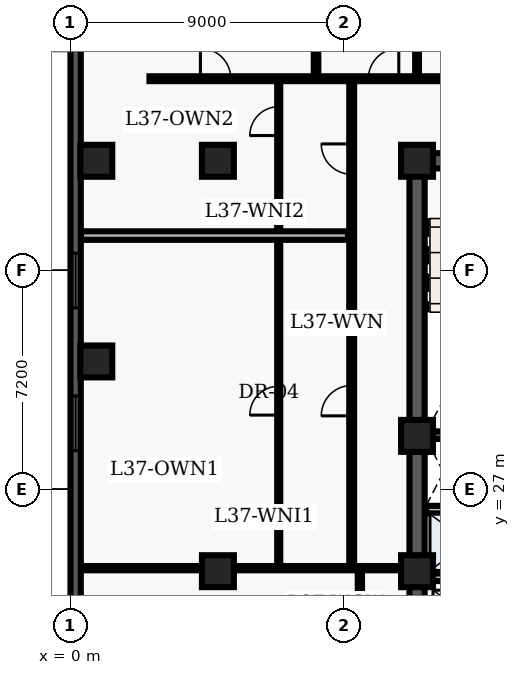
"""IFC4 building model, lengths in metres.
Left out: names, types, materials, properties, quantities, classifications, styles, units other than length and angle.
Written with IfcOpenShell. Run it as: python <this file> out.ifc"""

import sys

from ifc_helpers import new_model, entity, si_unit, converted_unit, direction, frame, origin_with_axes, origin_2d_with_axis, place, context, subcontext, project, spatial, polyline, rectangle, outline, extrude, element, fill, save


model = new_model("IFC4")
c1 = context("Model", 3, precision=1e-05, world=origin_with_axes(), true_north=direction((0.0, 1.0)))
c2 = subcontext(c1, "Body", "Model", "MODEL_VIEW")
j1 = project(units=[si_unit("LENGTHUNIT", "METRE"), converted_unit("PLANEANGLEUNIT", "DEGREE", entity("IfcPlaneAngleMeasure", 0.017), si_unit("PLANEANGLEUNIT", "RADIAN"), dimensions=[0, 0, 0, 0, 0, 0, 0])], contexts=[c1])
p1 = place(None, origin_with_axes())
s1 = spatial("IfcSite", under=j1, at=p1, CompositionType="ELEMENT")
p2 = place(p1, origin_with_axes())
s2 = spatial("IfcBuilding", under=s1, at=p2, CompositionType="ELEMENT")
p3 = place(p2, frame((0.0, 0.0, 152.4), z_axis=(0.0, 0.0, 1.0), x_axis=(1.0, 0.0, 0.0)))
s3 = spatial("IfcBuildingStorey", under=s2, at=p3, CompositionType="ELEMENT", Elevation=152.4)
p4 = place(p3, frame((11.4, 10.8, 0.0), z_axis=(0.0, 0.0, 1.0), x_axis=(0.0, 1.0, 0.0)))
e1 = element("IfcWall", 1, at=p4, inside=s3, PredefinedType="SHEAR", context=c2, shape_type="SweptSolid", body=[
    extrude(outline(polyline([(0.0, -0.25), (27.0, -0.25), (27.0, 0.25), (0.0, 0.25), (0.0, -0.25)])), origin_with_axes(), (0.0, 0.0, 1.0), 3.66),
])
p5 = place(p3, frame((11.4, 37.8, 0.0), z_axis=(0.0, 0.0, 1.0), x_axis=(1.0, 0.0, 0.0)))
e2 = element("IfcWall", 2, at=p5, inside=s3, PredefinedType="SHEAR", context=c2, shape_type="SweptSolid", body=[
    extrude(outline(polyline([(0.0, -0.25), (7.2, -0.25), (7.2, 0.25), (0.0, 0.25), (0.0, -0.25)])), origin_with_axes(), (0.0, 0.0, 1.0), 3.66),
])
p6 = place(p5, frame((2.625, 0.0, 0.0), z_axis=(0.0, 0.0, 1.0), x_axis=(1.0, 0.0, 0.0)))
e3 = element("IfcOpeningElement", 3, at=p6, cuts=e2, PredefinedType="OPENING", context=c2, shape_type="SweptSolid", body=[
    extrude(rectangle(XDim=1.05, YDim=0.52, at=origin_2d_with_axis()), origin_with_axes(), (0.0, 0.0, 1.0), 2.15),
])
p7 = place(p3, frame((11.65, 28.775, 0.0), z_axis=(0.0, 0.0, 1.0), x_axis=(1.0, 0.0, 0.0)))
e4 = element("IfcWall", 4, at=p7, inside=s3, PredefinedType="SHEAR", context=c2, shape_type="SweptSolid", body=[
    extrude(outline(polyline([(0.0, -0.125), (6.7, -0.125), (6.7, 0.125), (0.0, 0.125), (0.0, -0.125)])), origin_with_axes(), (0.0, 0.0, 1.0), 3.66),
])
p8 = place(p3, frame((11.7, 24.1, 0.0), z_axis=(0.0, 0.0, 1.0), x_axis=(1.0, 0.0, 0.0)))
e5 = element("IfcWall", 5, at=p8, inside=s3, PredefinedType="SOLIDWALL", context=c2, shape_type="SweptSolid", body=[
    extrude(outline(polyline([(0.0, -0.125), (6.6, -0.125), (6.6, 0.125), (0.0, 0.125), (0.0, -0.125)])), origin_with_axes(), (0.0, 0.0, 1.0), 2.7),
])
p9 = place(p8, frame((3.75, 0.0, 0.0), z_axis=(0.0, 0.0, 1.0), x_axis=(1.0, 0.0, 0.0)))
e6 = element("IfcOpeningElement", 6, at=p9, cuts=e5, PredefinedType="OPENING", context=c2, shape_type="SweptSolid", body=[
    extrude(rectangle(XDim=0.9, YDim=0.27, at=origin_2d_with_axis()), origin_with_axes(), (0.0, 0.0, 1.0), 2.15),
])
p10 = place(p3, frame((11.7, 26.325, 0.0), z_axis=(0.0, 0.0, 1.0), x_axis=(1.0, 0.0, 0.0)))
e7 = element("IfcWall", 7, at=p10, inside=s3, PredefinedType="SOLIDWALL", context=c2, shape_type="SweptSolid", body=[
    extrude(outline(polyline([(0.0, -0.125), (6.6, -0.125), (6.6, 0.125), (0.0, 0.125), (0.0, -0.125)])), origin_with_axes(), (0.0, 0.0, 1.0), 2.7),
])
p11 = place(p10, frame((3.5, 0.0, 0.0), z_axis=(0.0, 0.0, 1.0), x_axis=(1.0, 0.0, 0.0)))
e8 = element("IfcOpeningElement", 8, at=p11, cuts=e7, PredefinedType="OPENING", context=c2, shape_type="SweptSolid", body=[
    extrude(rectangle(XDim=0.9, YDim=0.27, at=origin_2d_with_axis()), origin_with_axes(), (0.0, 0.0, 1.0), 2.15),
])
for number, where, z_axis, x_axis in (
    (9, (11.4, 24.3, 0.0), (0.0, 0.0, 1.0), (1.0, 0.0, 0.0)),
    (10, (11.4, 28.75, 0.0), (0.0, 0.0, 1.0), (1.0, 0.0, 0.0)),
    (11, (11.4, 37.8, 0.0), (0.0, 0.0, 1.0), (1.0, 0.0, 0.0)),
    (12, (4.85, 24.3, 0.0), (0.0, 0.0, 1.0), (1.0, 0.0, 0.0)),
    (13, (4.85, 37.8, 0.0), (0.0, 0.0, 1.0), (1.0, 0.0, 0.0)),
    (14, (0.85, 31.2, 0.0), (0.0, 0.0, 1.0), (1.0, 0.0, 0.0)),
    (15, (0.85, 37.8, 0.0), (0.0, 0.0, 1.0), (1.0, 0.0, 0.0)),
):
    element("IfcColumn", number, at=place(p3, frame(where, z_axis=z_axis, x_axis=x_axis)), inside=s3, PredefinedType="COLUMN", context=c2, shape_type="SweptSolid", body=[
        extrude(rectangle(XDim=1.05, YDim=1.05, at=origin_2d_with_axis()), origin_with_axes(), (0.0, 0.0, 1.0), 3.9),
    ])
p12 = place(p3, frame((9.52, 20.4, 0.0), z_axis=(0.0, 0.0, 1.0), x_axis=(0.0, 1.0, 0.0)))
e16 = element("IfcWall", 16, at=p12, inside=s3, PredefinedType="PARTITIONING", context=c2, shape_type="SweptSolid", body=[
    extrude(outline(polyline([(0.0, -0.07), (4.0, -0.07), (4.0, 0.07), (0.0, 0.07), (0.0, -0.07)])), origin_with_axes(), (0.0, 0.0, 1.0), 2.7),
])
p13 = place(p3, frame((9.52, 24.4, 0.0), z_axis=(0.0, 0.0, 1.0), x_axis=(1.0, 0.0, 0.0)))
e17 = element("IfcWall", 17, at=p13, inside=s3, PredefinedType="PARTITIONING", context=c2, shape_type="SweptSolid", body=[
    extrude(outline(polyline([(0.0, -0.07), (1.58, -0.07), (1.58, 0.07), (0.0, 0.07), (0.0, -0.07)])), origin_with_axes(), (0.0, 0.0, 1.0), 2.7),
])
p14 = place(p3, frame((2.6, 40.5, 0.0), z_axis=(0.0, 0.0, 1.0), x_axis=(1.0, 0.0, 0.0)))
e18 = element("IfcWall", 18, at=p14, inside=s3, PredefinedType="PARTITIONING", context=c2, shape_type="SweptSolid", body=[
    extrude(outline(polyline([(0.0, -0.08), (19.792, -0.08), (19.792, 0.08), (0.0, 0.08), (0.0, -0.08)])), origin_with_axes(), (0.0, 0.0, 1.0), 2.7),
])
p15 = place(p14, frame((2.174, 0.0, 0.0), z_axis=(0.0, 0.0, 1.0), x_axis=(1.0, 0.0, 0.0)))
e19 = element("IfcOpeningElement", 19, at=p15, cuts=e18, PredefinedType="OPENING", context=c2, shape_type="SweptSolid", body=[
    extrude(rectangle(XDim=1.0, YDim=0.18, at=origin_2d_with_axis()), origin_with_axes(), (0.0, 0.0, 1.0), 2.15),
])
p16 = place(p14, frame((7.699, 0.0, 0.0), z_axis=(0.0, 0.0, 1.0), x_axis=(1.0, 0.0, 0.0)))
e20 = element("IfcOpeningElement", 20, at=p16, cuts=e18, PredefinedType="OPENING", context=c2, shape_type="SweptSolid", body=[
    extrude(rectangle(XDim=1.0, YDim=0.18, at=origin_2d_with_axis()), origin_with_axes(), (0.0, 0.0, 1.0), 2.15),
])
p17 = place(p14, frame((10.601, 0.0, 0.0), z_axis=(0.0, 0.0, 1.0), x_axis=(1.0, 0.0, 0.0)))
e21 = element("IfcOpeningElement", 21, at=p17, cuts=e18, PredefinedType="OPENING", context=c2, shape_type="SweptSolid", body=[
    extrude(rectangle(XDim=1.0, YDim=0.18, at=origin_2d_with_axis()), origin_with_axes(), (0.0, 0.0, 1.0), 2.15),
])
p18 = place(p14, frame((14.499, 0.0, 0.0), z_axis=(0.0, 0.0, 1.0), x_axis=(1.0, 0.0, 0.0)))
e22 = element("IfcOpeningElement", 22, at=p18, cuts=e18, PredefinedType="OPENING", context=c2, shape_type="SweptSolid", body=[
    extrude(rectangle(XDim=1.0, YDim=0.18, at=origin_2d_with_axis()), origin_with_axes(), (0.0, 0.0, 1.0), 2.15),
])
p19 = place(p3, frame((9.25, 24.4, 0.0), z_axis=(0.0, 0.0, 1.0), x_axis=(0.0, 1.0, 0.0)))
e23 = element("IfcWall", 23, at=p19, inside=s3, PredefinedType="PARTITIONING", context=c2, shape_type="SweptSolid", body=[
    extrude(outline(polyline([(0.0, -0.08), (16.1, -0.08), (16.1, 0.08), (0.0, 0.08), (0.0, -0.08)])), origin_with_axes(), (0.0, 0.0, 1.0), 2.7),
])
p20 = place(p19, frame((5.51, 0.0, 0.0), z_axis=(0.0, 0.0, 1.0), x_axis=(1.0, 0.0, 0.0)))
e24 = element("IfcOpeningElement", 24, at=p20, cuts=e23, PredefinedType="OPENING", context=c2, shape_type="SweptSolid", body=[
    extrude(rectangle(XDim=1.0, YDim=0.18, at=origin_2d_with_axis()), origin_with_axes(), (0.0, 0.0, 1.0), 2.15),
])
p21 = place(p19, frame((13.455, 0.0, 0.0), z_axis=(0.0, 0.0, 1.0), x_axis=(1.0, 0.0, 0.0)))
e25 = element("IfcOpeningElement", 25, at=p21, cuts=e23, PredefinedType="OPENING", context=c2, shape_type="SweptSolid", body=[
    extrude(rectangle(XDim=1.0, YDim=0.18, at=origin_2d_with_axis()), origin_with_axes(), (0.0, 0.0, 1.0), 2.15),
])
p22 = place(p3, frame((0.335, 24.4, 0.0), z_axis=(0.0, 0.0, 1.0), x_axis=(1.0, 0.0, 0.0)))
e26 = element("IfcWall", 26, at=p22, inside=s3, PredefinedType="PARTITIONING", context=c2, shape_type="SweptSolid", body=[
    extrude(outline(polyline([(0.0, -0.07), (9.185, -0.07), (9.185, 0.07), (0.0, 0.07), (0.0, -0.07)])), origin_with_axes(), (0.0, 0.0, 1.0), 2.7),
])
p23 = place(p3, frame((6.85, 24.55, 0.0), z_axis=(0.0, 0.0, 1.0), x_axis=(0.0, 1.0, 0.0)))
e27 = element("IfcWall", 27, at=p23, inside=s3, PredefinedType="PARTITIONING", context=c2, shape_type="SweptSolid", body=[
    extrude(outline(polyline([(0.0, -0.05), (15.75, -0.05), (15.75, 0.05), (0.0, 0.05), (0.0, -0.05)])), origin_with_axes(), (0.0, 0.0, 1.0), 2.7),
])
p24 = place(p23, frame((5.36, 0.0, 0.0), z_axis=(0.0, 0.0, 1.0), x_axis=(1.0, 0.0, 0.0)))
e28 = element("IfcOpeningElement", 28, at=p24, cuts=e27, PredefinedType="OPENING", context=c2, shape_type="SweptSolid", body=[
    extrude(rectangle(XDim=0.95, YDim=0.12, at=origin_2d_with_axis()), origin_with_axes(), (0.0, 0.0, 1.0), 2.15),
])
p25 = place(p23, frame((14.555, 0.0, 0.0), z_axis=(0.0, 0.0, 1.0), x_axis=(1.0, 0.0, 0.0)))
e29 = element("IfcOpeningElement", 29, at=p25, cuts=e27, PredefinedType="OPENING", context=c2, shape_type="SweptSolid", body=[
    extrude(rectangle(XDim=0.95, YDim=0.12, at=origin_2d_with_axis()), origin_with_axes(), (0.0, 0.0, 1.0), 2.15),
])
p26 = place(p3, frame((0.335, 35.34, 0.0), z_axis=(0.0, 0.0, 1.0), x_axis=(1.0, 0.0, 0.0)))
e30 = element("IfcWall", 30, at=p26, inside=s3, PredefinedType="PARTITIONING", context=c2, shape_type="SweptSolid", body=[
    extrude(outline(polyline([(0.0, -0.14), (8.795, -0.14), (8.795, 0.14), (0.0, 0.14), (0.0, -0.14)])), origin_with_axes(), (0.0, 0.0, 1.0), 2.7),
])
p27 = place(p3, frame((8.077, 40.6, 0.0), z_axis=(0.0, 0.0, 1.0), x_axis=(0.0, 1.0, 0.0)))
e31 = element("IfcWall", 31, at=p27, inside=s3, PredefinedType="PARTITIONING", context=c2, shape_type="SweptSolid", body=[
    extrude(outline(polyline([(0.0, -0.075), (7.665, -0.075), (7.665, 0.075), (0.0, 0.075), (0.0, -0.075)])), origin_with_axes(), (0.0, 0.0, 1.0), 2.7),
])
p28 = place(p3, frame((11.4, 40.6, 0.0), z_axis=(0.0, 0.0, 1.0), x_axis=(0.0, 1.0, 0.0)))
e32 = element("IfcWall", 32, at=p28, inside=s3, PredefinedType="PARTITIONING", context=c2, shape_type="SweptSolid", body=[
    extrude(outline(polyline([(0.0, -0.062), (7.665, -0.062), (7.665, 0.062), (0.0, 0.062), (0.0, -0.062)])), origin_with_axes(), (0.0, 0.0, 1.0), 2.7),
])
p29 = place(p3, frame((0.17, 2.74, 0.0), z_axis=(0.0, 0.0, 1.0), x_axis=(0.0, 1.0, 0.0)))
e33 = element("IfcWall", 33, at=p29, inside=s3, PredefinedType="SOLIDWALL", context=c2, shape_type="SweptSolid", body=[
    extrude(outline(polyline([(0.0, -0.17), (43.46, -0.17), (43.46, 0.17), (0.0, 0.17), (0.0, -0.17)])), origin_with_axes(), (0.0, 0.0, 1.0), 3.66),
])
p30 = place(p29, frame((2.948, 0.0, 0.45), z_axis=(0.0, 0.0, 1.0), x_axis=(1.0, 0.0, 0.0)))
e34 = element("IfcOpeningElement", 34, at=p30, cuts=e33, PredefinedType="OPENING", context=c2, shape_type="SweptSolid", body=[
    extrude(rectangle(XDim=1.8, YDim=0.36, at=origin_2d_with_axis()), origin_with_axes(), (0.0, 0.0, 1.0), 2.1),
])
p31 = place(p29, frame((12.339, 0.0, 0.45), z_axis=(0.0, 0.0, 1.0), x_axis=(1.0, 0.0, 0.0)))
e35 = element("IfcOpeningElement", 35, at=p31, cuts=e33, PredefinedType="OPENING", context=c2, shape_type="SweptSolid", body=[
    extrude(rectangle(XDim=1.8, YDim=0.36, at=origin_2d_with_axis()), origin_with_axes(), (0.0, 0.0, 1.0), 2.1),
])
p32 = place(p29, frame((26.426, 0.0, 0.45), z_axis=(0.0, 0.0, 1.0), x_axis=(1.0, 0.0, 0.0)))
e36 = element("IfcOpeningElement", 36, at=p32, cuts=e33, PredefinedType="OPENING", context=c2, shape_type="SweptSolid", body=[
    extrude(rectangle(XDim=1.8, YDim=0.36, at=origin_2d_with_axis()), origin_with_axes(), (0.0, 0.0, 1.0), 2.1),
])
p33 = place(p29, frame((31.121, 0.0, 0.45), z_axis=(0.0, 0.0, 1.0), x_axis=(1.0, 0.0, 0.0)))
e37 = element("IfcOpeningElement", 37, at=p33, cuts=e33, PredefinedType="OPENING", context=c2, shape_type="SweptSolid", body=[
    extrude(rectangle(XDim=1.8, YDim=0.36, at=origin_2d_with_axis()), origin_with_axes(), (0.0, 0.0, 1.0), 2.1),
])
p34 = place(p29, frame((40.062, 0.0, 0.45), z_axis=(0.0, 0.0, 1.0), x_axis=(1.0, 0.0, 0.0)))
e38 = element("IfcOpeningElement", 38, at=p34, cuts=e33, PredefinedType="OPENING", context=c2, shape_type="SweptSolid", body=[
    extrude(rectangle(XDim=1.8, YDim=0.36, at=origin_2d_with_axis()), origin_with_axes(), (0.0, 0.0, 1.0), 2.1),
])
p35 = place(p23, frame((5.36, 0.0, 0.0), z_axis=(0.0, 0.0, 1.0), x_axis=(1.0, 0.0, 0.0)))
e39 = element("IfcDoor", 39, at=p35, inside=s3, OperationType="SINGLE_SWING_LEFT", PredefinedType="DOOR", context=c2, shape_type="SweptSolid", body=[
    extrude(rectangle(XDim=0.95, YDim=0.06, at=origin_2d_with_axis()), origin_with_axes(), (0.0, 0.0, 1.0), 2.15),
])
fill(e28, e39)
p36 = place(p19, frame((5.51, 0.0, 0.0), z_axis=(0.0, 0.0, 1.0), x_axis=(1.0, 0.0, 0.0)))
e40 = element("IfcDoor", 40, at=p36, inside=s3, OperationType="SINGLE_SWING_LEFT", PredefinedType="DOOR", context=c2, shape_type="SweptSolid", body=[
    extrude(rectangle(XDim=1.0, YDim=0.09, at=origin_2d_with_axis()), origin_with_axes(), (0.0, 0.0, 1.0), 2.15),
])
fill(e24, e40)
p37 = place(p23, frame((14.555, 0.0, 0.0), z_axis=(0.0, 0.0, 1.0), x_axis=(1.0, 0.0, 0.0)))
e41 = element("IfcDoor", 41, at=p37, inside=s3, OperationType="SINGLE_SWING_LEFT", PredefinedType="DOOR", context=c2, shape_type="SweptSolid", body=[
    extrude(rectangle(XDim=0.95, YDim=0.06, at=origin_2d_with_axis()), origin_with_axes(), (0.0, 0.0, 1.0), 2.15),
])
fill(e29, e41)
p38 = place(p19, frame((13.455, 0.0, 0.0), z_axis=(0.0, 0.0, 1.0), x_axis=(1.0, 0.0, 0.0)))
e42 = element("IfcDoor", 42, at=p38, inside=s3, OperationType="SINGLE_SWING_RIGHT", PredefinedType="DOOR", context=c2, shape_type="SweptSolid", body=[
    extrude(rectangle(XDim=1.0, YDim=0.09, at=origin_2d_with_axis()), origin_with_axes(), (0.0, 0.0, 1.0), 2.15),
])
fill(e25, e42)
p39 = place(p14, frame((2.174, 0.0, 0.0), z_axis=(0.0, 0.0, 1.0), x_axis=(1.0, 0.0, 0.0)))
e43 = element("IfcDoor", 43, at=p39, inside=s3, OperationType="SINGLE_SWING_LEFT", PredefinedType="DOOR", context=c2, shape_type="SweptSolid", body=[
    extrude(rectangle(XDim=1.0, YDim=0.09, at=origin_2d_with_axis()), origin_with_axes(), (0.0, 0.0, 1.0), 2.15),
])
fill(e19, e43)
p40 = place(p14, frame((7.699, 0.0, 0.0), z_axis=(0.0, 0.0, 1.0), x_axis=(1.0, 0.0, 0.0)))
e44 = element("IfcDoor", 44, at=p40, inside=s3, OperationType="SINGLE_SWING_RIGHT", PredefinedType="DOOR", context=c2, shape_type="SweptSolid", body=[
    extrude(rectangle(XDim=1.0, YDim=0.09, at=origin_2d_with_axis()), origin_with_axes(), (0.0, 0.0, 1.0), 2.15),
])
fill(e20, e44)
p41 = place(p29, frame((26.426, 0.0, 0.45), z_axis=(0.0, 0.0, 1.0), x_axis=(1.0, 0.0, 0.0)))
e45 = element("IfcWindow", 45, at=p41, inside=s3, PredefinedType="WINDOW", context=c2, shape_type="SweptSolid", body=[
    extrude(rectangle(XDim=1.8, YDim=0.09, at=origin_2d_with_axis()), origin_with_axes(), (0.0, 0.0, 1.0), 2.1),
])
fill(e36, e45)
p42 = place(p29, frame((31.121, 0.0, 0.45), z_axis=(0.0, 0.0, 1.0), x_axis=(1.0, 0.0, 0.0)))
e46 = element("IfcWindow", 46, at=p42, inside=s3, PredefinedType="WINDOW", context=c2, shape_type="SweptSolid", body=[
    extrude(rectangle(XDim=1.8, YDim=0.09, at=origin_2d_with_axis()), origin_with_axes(), (0.0, 0.0, 1.0), 2.1),
])
fill(e37, e46)
save(model, sys.argv[1])
